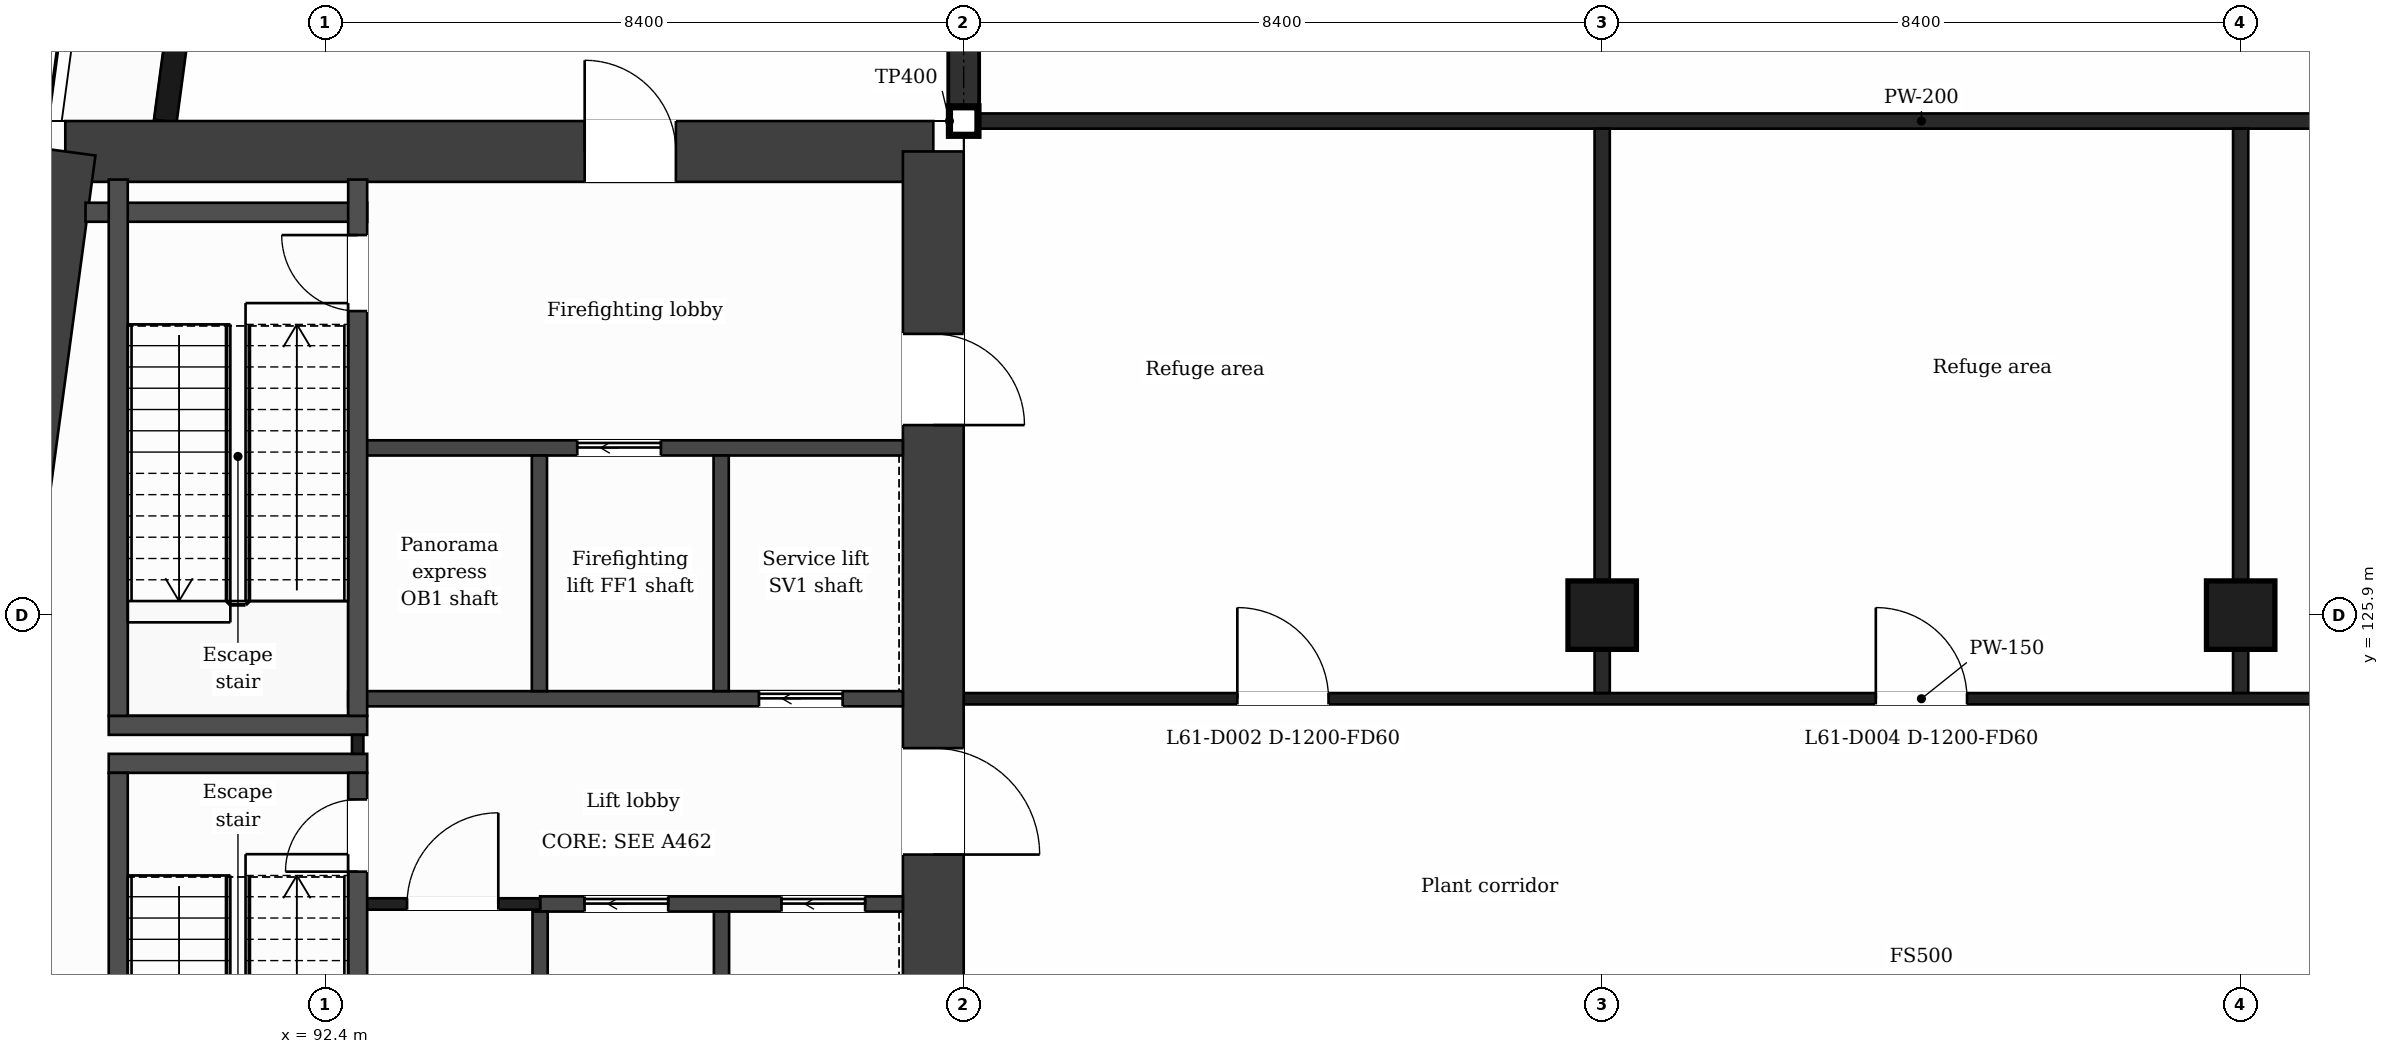
"""IFC4 building model, lengths in metres.
Left out: names, types, materials, properties, quantities, classifications, styles, units other than length and angle.
Written with IfcOpenShell. Run it as: python <this file> out.ifc"""

import sys

from ifc_helpers import new_model, si_unit, direction, frame, frame_2d, origin, origin_2d, place, context, subcontext, project, spatial, rectangle, extrude, element, fill, save


model = new_model("IFC4")
c1 = context("Model", 3, precision=1e-05, world=origin(), true_north=direction((0.0, 1.0)))
c2 = subcontext(c1, "Body", "Model", "MODEL_VIEW")
j1 = project(units=[si_unit("LENGTHUNIT", "METRE"), si_unit("PLANEANGLEUNIT", "RADIAN")], contexts=[c1])
p1 = place(None, origin())
s1 = spatial("IfcSite", under=j1, at=p1, CompositionType="ELEMENT")
p2 = place(p1, origin())
s2 = spatial("IfcBuilding", under=s1, at=p2, CompositionType="ELEMENT")
p3 = place(p2, frame((0.0, 0.0, 254.0)))
s3 = spatial("IfcBuildingStorey", under=s2, at=p3, CompositionType="ELEMENT", Elevation=254.0)
p4 = place(p3, frame((88.98, 132.0, 0.0), z_axis=(0.0, 0.0, 1.0), x_axis=(1.0, 0.0, 0.0)))
e1 = element("IfcWall", 1, at=p4, inside=s3, PredefinedType="SHEAR", context=c2, shape_type="SweptSolid", body=[
    extrude(rectangle(XDim=11.419, YDim=0.8, at=frame_2d((5.71, 0.0))), origin(), (0.0, 0.0, 1.0), 5.0),
])
p5 = place(p4, frame((6.833, 0.0, 0.0)))
e2 = element("IfcOpeningElement", 2, at=p5, cuts=e1, PredefinedType="OPENING", context=c2, shape_type="SweptSolid", body=[
    extrude(rectangle(XDim=1.2, YDim=2.1, at=frame_2d((0.6, 1.05))), frame((0.0, 0.41, 0.0), z_axis=(0.0, -1.0, 0.0), x_axis=(1.0, 0.0, 0.0)), (0.0, 0.0, 1.0), 0.82),
])
p6 = place(p3, frame((100.4, 132.0, 0.0), z_axis=(0.0, 0.0, 1.0), x_axis=(0.0, -1.0, 0.0)))
e3 = element("IfcWall", 3, at=p6, inside=s3, PredefinedType="SHEAR", context=c2, shape_type="SweptSolid", body=[
    extrude(rectangle(XDim=21.2, YDim=0.8, at=frame_2d((10.6, 0.0))), origin(), (0.0, 0.0, 1.0), 5.0),
])
p7 = place(p6, frame((2.4, 0.0, 0.0)))
e4 = element("IfcOpeningElement", 4, at=p7, cuts=e3, PredefinedType="OPENING", context=c2, shape_type="SweptSolid", body=[
    extrude(rectangle(XDim=1.2, YDim=2.1, at=frame_2d((0.6, 1.05))), frame((0.0, 0.41, 0.0), z_axis=(0.0, -1.0, 0.0), x_axis=(1.0, 0.0, 0.0)), (0.0, 0.0, 1.0), 0.82),
])
p8 = place(p6, frame((7.85, 0.0, 0.0)))
e5 = element("IfcOpeningElement", 5, at=p8, cuts=e3, PredefinedType="OPENING", context=c2, shape_type="SweptSolid", body=[
    extrude(rectangle(XDim=1.4, YDim=2.1, at=frame_2d((0.7, 1.05))), frame((0.0, 0.41, 0.0), z_axis=(0.0, -1.0, 0.0), x_axis=(1.0, 0.0, 0.0)), (0.0, 0.0, 1.0), 0.82),
])
p9 = place(p3, frame((86.127, 110.8, 0.0), z_axis=(0.0, 0.0, 1.0), x_axis=(0.133408347329, 0.991061154956, 0.0)))
e6 = element("IfcWall", 6, at=p9, inside=s3, PredefinedType="SHEAR", context=c2, shape_type="SweptSolid", body=[
    extrude(rectangle(XDim=21.391, YDim=0.8, at=frame_2d((10.696, 0.0))), origin(), (0.0, 0.0, 1.0), 5.0),
])
for number, where, z_axis, x_axis in (
    (7, (109.2, 125.9, 0.0), (0.0, 0.0, 1.0), (1.0, 0.0, 0.0)),
    (8, (117.6, 125.9, 0.0), (0.0, 0.0, 1.0), (1.0, 0.0, 0.0)),
):
    element("IfcColumn", number, at=place(p3, frame(where, z_axis=z_axis, x_axis=x_axis)), inside=s3, PredefinedType="COLUMN", context=c2, shape_type="SweptSolid", body=[
        extrude(rectangle(XDim=0.9, YDim=0.9, at=origin_2d()), origin(), (0.0, 0.0, 1.0), 5.0),
    ])
p10 = place(p3, frame((91.177, 138.95, 0.0), z_axis=(0.0, 0.0, 1.0), x_axis=(-0.133426664613, -0.991058689065, 0.0)))
e9 = element("IfcWall", 9, at=p10, inside=s3, PredefinedType="SOLIDWALL", context=c2, shape_type="SweptSolid", body=[
    extrude(rectangle(XDim=6.609, YDim=0.3, at=frame_2d((3.305, 0.0))), origin(), (0.0, 0.0, 1.0), 4.68),
])
p11 = place(p10, frame((4.294, 0.0, 0.0)))
e10 = element("IfcOpeningElement", 10, at=p11, cuts=e9, PredefinedType="OPENING", context=c2, shape_type="SweptSolid", body=[
    extrude(rectangle(XDim=1.2, YDim=2.4, at=frame_2d((0.6, 1.2))), frame((0.0, 0.16, 0.0), z_axis=(0.0, -1.0, 0.0), x_axis=(1.0, 0.0, 0.0)), (0.0, 0.0, 1.0), 0.32),
])
p12 = place(p3, frame((95.227, 122.1, 0.0), z_axis=(0.0, 0.0, 1.0), x_axis=(1.0, 0.0, 0.0)))
e11 = element("IfcWall", 11, at=p12, inside=s3, PredefinedType="PARTITIONING", context=c2, shape_type="SweptSolid", body=[
    extrude(rectangle(XDim=4.773, YDim=0.2, at=frame_2d((2.386, 0.0))), origin(), (0.0, 0.0, 1.0), 4.68),
])
p13 = place(p12, frame((0.585, 0.0, 0.0)))
e12 = element("IfcOpeningElement", 12, at=p13, cuts=e11, PredefinedType="OPENING", context=c2, shape_type="SweptSolid", body=[
    extrude(rectangle(XDim=1.1, YDim=2.1, at=frame_2d((0.55, 1.05))), frame((0.0, 0.11, 0.0), z_axis=(0.0, -1.0, 0.0), x_axis=(1.0, 0.0, 0.0)), (0.0, 0.0, 1.0), 0.22),
])
p14 = place(p12, frame((3.176, 0.0, 0.0)))
e13 = element("IfcOpeningElement", 13, at=p14, cuts=e11, PredefinedType="OPENING", context=c2, shape_type="SweptSolid", body=[
    extrude(rectangle(XDim=1.1, YDim=2.1, at=frame_2d((0.55, 1.05))), frame((0.0, 0.11, 0.0), z_axis=(0.0, -1.0, 0.0), x_axis=(1.0, 0.0, 0.0)), (0.0, 0.0, 1.0), 0.22),
])
p15 = place(p3, frame((92.827, 122.1, 0.0), z_axis=(0.0, 0.0, 1.0), x_axis=(1.0, 0.0, 0.0)))
e14 = element("IfcWall", 14, at=p15, inside=s3, PredefinedType="PARTITIONING", context=c2, shape_type="SweptSolid", body=[
    extrude(rectangle(XDim=2.4, YDim=0.15, at=frame_2d((1.2, 0.0))), origin(), (0.0, 0.0, 1.0), 4.68),
])
p16 = place(p15, frame((0.65, 0.0, 0.0)))
e15 = element("IfcOpeningElement", 15, at=p16, cuts=e14, PredefinedType="OPENING", context=c2, shape_type="SweptSolid", body=[
    extrude(rectangle(XDim=1.2, YDim=2.1, at=frame_2d((0.6, 1.05))), frame((0.0, 0.085, 0.0), z_axis=(0.0, -1.0, 0.0), x_axis=(1.0, 0.0, 0.0)), (0.0, 0.0, 1.0), 0.17),
])
for number, where, z_axis, x_axis in (
    (16, (89.552, 123.95, 0.0), (0.0, 0.0, 1.0), (1.0, 0.0, 0.0)),
    (17, (89.552, 124.45, 0.0), (0.0, 0.0, 1.0), (1.0, 0.0, 0.0)),
):
    element("IfcWall", number, at=place(p3, frame(where, z_axis=z_axis, x_axis=x_axis)), inside=s3, PredefinedType="PARTITIONING", context=c2, shape_type="SweptSolid", body=[
        extrude(rectangle(XDim=3.4, YDim=0.25, at=frame_2d((1.7, 0.0))), origin(), (0.0, 0.0, 1.0), 4.68),
    ])
p17 = place(p3, frame((92.702, 124.8, 0.0), z_axis=(0.0, 0.0, 1.0), x_axis=(1.0, 0.0, 0.0)))
e18 = element("IfcWall", 18, at=p17, inside=s3, PredefinedType="PARTITIONING", context=c2, shape_type="SweptSolid", body=[
    extrude(rectangle(XDim=7.298, YDim=0.2, at=frame_2d((3.649, 0.0))), origin(), (0.0, 0.0, 1.0), 4.68),
])
p18 = place(p17, frame((5.405, 0.0, 0.0)))
e19 = element("IfcOpeningElement", 19, at=p18, cuts=e18, PredefinedType="OPENING", context=c2, shape_type="SweptSolid", body=[
    extrude(rectangle(XDim=1.1, YDim=2.1, at=frame_2d((0.55, 1.05))), frame((0.0, 0.11, 0.0), z_axis=(0.0, -1.0, 0.0), x_axis=(1.0, 0.0, 0.0)), (0.0, 0.0, 1.0), 0.22),
])
p19 = place(p3, frame((100.8, 124.8, 0.0), z_axis=(0.0, 0.0, 1.0), x_axis=(1.0, 0.0, 0.0)))
e20 = element("IfcWall", 20, at=p19, inside=s3, PredefinedType="PARTITIONING", context=c2, shape_type="SweptSolid", body=[
    extrude(rectangle(XDim=25.2, YDim=0.15, at=frame_2d((12.6, 0.0))), origin(), (0.0, 0.0, 1.0), 4.68),
])
p20 = place(p19, frame((3.6, 0.0, 0.0)))
e21 = element("IfcOpeningElement", 21, at=p20, cuts=e20, PredefinedType="OPENING", context=c2, shape_type="SweptSolid", body=[
    extrude(rectangle(XDim=1.2, YDim=2.1, at=frame_2d((0.6, 1.05))), frame((0.0, 0.085, 0.0), z_axis=(0.0, -1.0, 0.0), x_axis=(1.0, 0.0, 0.0)), (0.0, 0.0, 1.0), 0.17),
])
p21 = place(p19, frame((12.0, 0.0, 0.0)))
e22 = element("IfcOpeningElement", 22, at=p21, cuts=e20, PredefinedType="OPENING", context=c2, shape_type="SweptSolid", body=[
    extrude(rectangle(XDim=1.2, YDim=2.1, at=frame_2d((0.6, 1.05))), frame((0.0, 0.085, 0.0), z_axis=(0.0, -1.0, 0.0), x_axis=(1.0, 0.0, 0.0)), (0.0, 0.0, 1.0), 0.17),
])
p22 = place(p19, frame((20.4, 0.0, 0.0)))
e23 = element("IfcOpeningElement", 23, at=p22, cuts=e20, PredefinedType="OPENING", context=c2, shape_type="SweptSolid", body=[
    extrude(rectangle(XDim=1.2, YDim=2.1, at=frame_2d((0.6, 1.05))), frame((0.0, 0.085, 0.0), z_axis=(0.0, -1.0, 0.0), x_axis=(1.0, 0.0, 0.0)), (0.0, 0.0, 1.0), 0.17),
])
p23 = place(p3, frame((92.827, 128.1, 0.0), z_axis=(0.0, 0.0, 1.0), x_axis=(1.0, 0.0, 0.0)))
e24 = element("IfcWall", 24, at=p23, inside=s3, PredefinedType="PARTITIONING", context=c2, shape_type="SweptSolid", body=[
    extrude(rectangle(XDim=7.173, YDim=0.2, at=frame_2d((3.586, 0.0))), origin(), (0.0, 0.0, 1.0), 4.68),
])
p24 = place(p23, frame((2.889, 0.0, 0.0)))
e25 = element("IfcOpeningElement", 25, at=p24, cuts=e24, PredefinedType="OPENING", context=c2, shape_type="SweptSolid", body=[
    extrude(rectangle(XDim=1.1, YDim=2.1, at=frame_2d((0.55, 1.05))), frame((0.0, 0.11, 0.0), z_axis=(0.0, -1.0, 0.0), x_axis=(1.0, 0.0, 0.0)), (0.0, 0.0, 1.0), 0.22),
])
p25 = place(p3, frame((89.246, 131.2, 0.0), z_axis=(0.0, 0.0, 1.0), x_axis=(1.0, 0.0, 0.0)))
e26 = element("IfcWall", 26, at=p25, inside=s3, PredefinedType="PARTITIONING", context=c2, shape_type="SweptSolid", body=[
    extrude(rectangle(XDim=3.706, YDim=0.25, at=frame_2d((1.853, 0.0))), origin(), (0.0, 0.0, 1.0), 4.68),
])
p26 = place(p3, frame((100.7, 132.4, 0.0), z_axis=(0.0, 0.0, 1.0), x_axis=(1.0, 0.0, 0.0)))
e27 = element("IfcWall", 27, at=p26, inside=s3, PredefinedType="PARTITIONING", context=c2, shape_type="SweptSolid", body=[
    extrude(rectangle(XDim=25.4, YDim=0.2, at=frame_2d((12.7, 0.0))), origin(), (0.0, 0.0, 1.0), 4.68),
])
p27 = place(p26, frame((20.5, 0.0, 0.0)))
e28 = element("IfcOpeningElement", 28, at=p27, cuts=e27, PredefinedType="OPENING", context=c2, shape_type="SweptSolid", body=[
    extrude(rectangle(XDim=1.2, YDim=2.1, at=frame_2d((0.6, 1.05))), frame((0.0, 0.11, 0.0), z_axis=(0.0, -1.0, 0.0), x_axis=(1.0, 0.0, 0.0)), (0.0, 0.0, 1.0), 0.22),
])
for number, where, z_axis, x_axis in (
    (29, (89.677, 116.77, 0.0), (0.0, 0.0, 1.0), (0.0, 1.0, 0.0)),
    (30, (89.677, 124.575, 0.0), (0.0, 0.0, 1.0), (0.0, 1.0, 0.0)),
):
    element("IfcWall", number, at=place(p3, frame(where, z_axis=z_axis, x_axis=x_axis)), inside=s3, PredefinedType="PARTITIONING", context=c2, shape_type="SweptSolid", body=[
        extrude(rectangle(XDim=7.055, YDim=0.25, at=frame_2d((3.527, 0.0))), origin(), (0.0, 0.0, 1.0), 4.68),
    ])
p28 = place(p3, frame((92.827, 124.075, 0.0), z_axis=(0.0, 0.0, 1.0), x_axis=(0.0, 1.0, 0.0)))
e31 = element("IfcWall", 31, at=p28, inside=s3, PredefinedType="PARTITIONING", context=c2, shape_type="SweptSolid", body=[
    extrude(rectangle(XDim=0.25, YDim=0.15, at=frame_2d((0.125, 0.0))), origin(), (0.0, 0.0, 1.0), 4.68),
])
p29 = place(p3, frame((92.827, 116.77, 0.0), z_axis=(0.0, 0.0, 1.0), x_axis=(0.0, 1.0, 0.0)))
e32 = element("IfcWall", 32, at=p29, inside=s3, PredefinedType="PARTITIONING", context=c2, shape_type="SweptSolid", body=[
    extrude(rectangle(XDim=7.055, YDim=0.25, at=frame_2d((3.527, 0.0))), origin(), (0.0, 0.0, 1.0), 4.68),
])
p30 = place(p29, frame((5.755, 0.0, 0.0)))
e33 = element("IfcOpeningElement", 33, at=p30, cuts=e32, PredefinedType="OPENING", context=c2, shape_type="SweptSolid", body=[
    extrude(rectangle(XDim=0.95, YDim=2.1, at=frame_2d((0.475, 1.05))), frame((0.0, 0.135, 0.0), z_axis=(0.0, -1.0, 0.0), x_axis=(1.0, 0.0, 0.0)), (0.0, 0.0, 1.0), 0.27),
])
p31 = place(p3, frame((92.827, 124.575, 0.0), z_axis=(0.0, 0.0, 1.0), x_axis=(0.0, 1.0, 0.0)))
e34 = element("IfcWall", 34, at=p31, inside=s3, PredefinedType="PARTITIONING", context=c2, shape_type="SweptSolid", body=[
    extrude(rectangle(XDim=7.055, YDim=0.25, at=frame_2d((3.527, 0.0))), origin(), (0.0, 0.0, 1.0), 4.68),
])
p32 = place(p31, frame((5.325, 0.0, 0.0)))
e35 = element("IfcOpeningElement", 35, at=p32, cuts=e34, PredefinedType="OPENING", context=c2, shape_type="SweptSolid", body=[
    extrude(rectangle(XDim=1.0, YDim=2.1, at=frame_2d((0.5, 1.05))), frame((0.0, 0.135, 0.0), z_axis=(0.0, -1.0, 0.0), x_axis=(1.0, 0.0, 0.0)), (0.0, 0.0, 1.0), 0.27),
])
p33 = place(p3, frame((95.218, 124.9, 0.0), z_axis=(0.0, 0.0, 1.0), x_axis=(0.0, 1.0, 0.0)))
e36 = element("IfcWall", 36, at=p33, inside=s3, PredefinedType="PARTITIONING", context=c2, shape_type="SweptSolid", body=[
    extrude(rectangle(XDim=3.1, YDim=0.2, at=frame_2d((1.55, 0.0))), origin(), (0.0, 0.0, 1.0), 4.68),
])
p34 = place(p3, frame((95.227, 116.77, 0.0), z_axis=(0.0, 0.0, 1.0), x_axis=(0.0, 1.0, 0.0)))
e37 = element("IfcWall", 37, at=p34, inside=s3, PredefinedType="PARTITIONING", context=c2, shape_type="SweptSolid", body=[
    extrude(rectangle(XDim=5.23, YDim=0.2, at=frame_2d((2.615, 0.0))), origin(), (0.0, 0.0, 1.0), 4.68),
])
p35 = place(p34, frame((0.78, 0.0, 0.0)))
e38 = element("IfcOpeningElement", 38, at=p35, cuts=e37, PredefinedType="OPENING", context=c2, shape_type="SweptSolid", body=[
    extrude(rectangle(XDim=0.9, YDim=2.1, at=frame_2d((0.45, 1.05))), frame((0.0, 0.11, 0.0), z_axis=(0.0, -1.0, 0.0), x_axis=(1.0, 0.0, 0.0)), (0.0, 0.0, 1.0), 0.22),
])
for number, where, z_axis, x_axis in (
    (39, (97.609, 124.9, 0.0), (0.0, 0.0, 1.0), (0.0, 1.0, 0.0)),
    (40, (97.614, 118.9, 0.0), (0.0, 0.0, 1.0), (0.0, 1.0, 0.0)),
):
    element("IfcWall", number, at=place(p3, frame(where, z_axis=z_axis, x_axis=x_axis)), inside=s3, PredefinedType="PARTITIONING", context=c2, shape_type="SweptSolid", body=[
        extrude(rectangle(XDim=3.1, YDim=0.2, at=frame_2d((1.55, 0.0))), origin(), (0.0, 0.0, 1.0), 4.68),
    ])
p36 = place(p3, frame((100.8, 132.5, 0.0), z_axis=(0.0, 0.0, 1.0), x_axis=(0.0, 1.0, 0.0)))
e41 = element("IfcWall", 41, at=p36, inside=s3, PredefinedType="PARTITIONING", context=c2, shape_type="SweptSolid", body=[
    extrude(rectangle(XDim=10.51, YDim=0.2, at=frame_2d((5.255, 0.0))), origin(), (0.0, 0.0, 1.0), 4.68),
])
for number, where, z_axis, x_axis in (
    (42, (109.2, 124.875, 0.0), (0.0, 0.0, 1.0), (0.0, 1.0, 0.0)),
    (43, (117.6, 124.875, 0.0), (0.0, 0.0, 1.0), (0.0, 1.0, 0.0)),
):
    element("IfcWall", number, at=place(p3, frame(where, z_axis=z_axis, x_axis=x_axis)), inside=s3, PredefinedType="PARTITIONING", context=c2, shape_type="SweptSolid", body=[
        extrude(rectangle(XDim=7.425, YDim=0.2, at=frame_2d((3.712, 0.0))), origin(), (0.0, 0.0, 1.0), 4.68),
    ])
p37 = place(p20, origin())
e44 = element("IfcDoor", 44, at=p37, inside=s3, OperationType="SINGLE_SWING_LEFT", PredefinedType="DOOR", context=c2, shape_type="SweptSolid", body=[
    extrude(rectangle(XDim=1.2, YDim=2.1, at=frame_2d((0.6, 1.05))), frame((0.0, 0.025, 0.0), z_axis=(0.0, -1.0, 0.0), x_axis=(1.0, 0.0, 0.0)), (0.0, 0.0, 1.0), 0.05),
])
fill(e21, e44)
p38 = place(p21, origin())
e45 = element("IfcDoor", 45, at=p38, inside=s3, OperationType="SINGLE_SWING_LEFT", PredefinedType="DOOR", context=c2, shape_type="SweptSolid", body=[
    extrude(rectangle(XDim=1.2, YDim=2.1, at=frame_2d((0.6, 1.05))), frame((0.0, 0.025, 0.0), z_axis=(0.0, -1.0, 0.0), x_axis=(1.0, 0.0, 0.0)), (0.0, 0.0, 1.0), 0.05),
])
fill(e22, e45)
p39 = place(p16, origin())
e46 = element("IfcDoor", 46, at=p39, inside=s3, OperationType="SINGLE_SWING_RIGHT", PredefinedType="DOOR", context=c2, shape_type="SweptSolid", body=[
    extrude(rectangle(XDim=1.2, YDim=2.1, at=frame_2d((0.6, 1.05))), frame((0.0, 0.025, 0.0), z_axis=(0.0, -1.0, 0.0), x_axis=(1.0, 0.0, 0.0)), (0.0, 0.0, 1.0), 0.05),
])
fill(e15, e46)
p40 = place(p13, origin())
e47 = element("IfcDoor", 47, at=p40, inside=s3, OperationType="SLIDING_TO_LEFT", PredefinedType="DOOR", context=c2, shape_type="SweptSolid", body=[
    extrude(rectangle(XDim=1.1, YDim=2.1, at=frame_2d((0.55, 1.05))), frame((0.0, 0.025, 0.0), z_axis=(0.0, -1.0, 0.0), x_axis=(1.0, 0.0, 0.0)), (0.0, 0.0, 1.0), 0.05),
])
fill(e12, e47)
p41 = place(p14, origin())
e48 = element("IfcDoor", 48, at=p41, inside=s3, OperationType="SLIDING_TO_LEFT", PredefinedType="DOOR", context=c2, shape_type="SweptSolid", body=[
    extrude(rectangle(XDim=1.1, YDim=2.1, at=frame_2d((0.55, 1.05))), frame((0.0, 0.025, 0.0), z_axis=(0.0, -1.0, 0.0), x_axis=(1.0, 0.0, 0.0)), (0.0, 0.0, 1.0), 0.05),
])
fill(e13, e48)
p42 = place(p24, origin())
e49 = element("IfcDoor", 49, at=p42, inside=s3, OperationType="SLIDING_TO_LEFT", PredefinedType="DOOR", context=c2, shape_type="SweptSolid", body=[
    extrude(rectangle(XDim=1.1, YDim=2.1, at=frame_2d((0.55, 1.05))), frame((0.0, 0.025, 0.0), z_axis=(0.0, -1.0, 0.0), x_axis=(1.0, 0.0, 0.0)), (0.0, 0.0, 1.0), 0.05),
])
fill(e25, e49)
p43 = place(p18, origin())
e50 = element("IfcDoor", 50, at=p43, inside=s3, OperationType="SLIDING_TO_LEFT", PredefinedType="DOOR", context=c2, shape_type="SweptSolid", body=[
    extrude(rectangle(XDim=1.1, YDim=2.1, at=frame_2d((0.55, 1.05))), frame((0.0, 0.025, 0.0), z_axis=(0.0, -1.0, 0.0), x_axis=(1.0, 0.0, 0.0)), (0.0, 0.0, 1.0), 0.05),
])
fill(e19, e50)
p44 = place(p30, origin())
e51 = element("IfcDoor", 51, at=p44, inside=s3, OperationType="SINGLE_SWING_LEFT", PredefinedType="DOOR", context=c2, shape_type="SweptSolid", body=[
    extrude(rectangle(XDim=0.95, YDim=2.1, at=frame_2d((0.475, 1.05))), frame((0.0, 0.025, 0.0), z_axis=(0.0, -1.0, 0.0), x_axis=(1.0, 0.0, 0.0)), (0.0, 0.0, 1.0), 0.05),
])
fill(e33, e51)
p45 = place(p32, origin())
e52 = element("IfcDoor", 52, at=p45, inside=s3, OperationType="SINGLE_SWING_RIGHT", PredefinedType="DOOR", context=c2, shape_type="SweptSolid", body=[
    extrude(rectangle(XDim=1.0, YDim=2.1, at=frame_2d((0.5, 1.05))), frame((0.0, 0.025, 0.0), z_axis=(0.0, -1.0, 0.0), x_axis=(1.0, 0.0, 0.0)), (0.0, 0.0, 1.0), 0.05),
])
fill(e35, e52)
p46 = place(p5, origin())
e53 = element("IfcDoor", 53, at=p46, inside=s3, OperationType="SINGLE_SWING_LEFT", PredefinedType="DOOR", context=c2, shape_type="SweptSolid", body=[
    extrude(rectangle(XDim=1.2, YDim=2.1, at=frame_2d((0.6, 1.05))), frame((0.0, 0.025, 0.0), z_axis=(0.0, -1.0, 0.0), x_axis=(1.0, 0.0, 0.0)), (0.0, 0.0, 1.0), 0.05),
])
fill(e2, e53)
p47 = place(p7, origin())
e54 = element("IfcDoor", 54, at=p47, inside=s3, OperationType="SINGLE_SWING_RIGHT", PredefinedType="DOOR", context=c2, shape_type="SweptSolid", body=[
    extrude(rectangle(XDim=1.2, YDim=2.1, at=frame_2d((0.6, 1.05))), frame((0.0, 0.025, 0.0), z_axis=(0.0, -1.0, 0.0), x_axis=(1.0, 0.0, 0.0)), (0.0, 0.0, 1.0), 0.05),
])
fill(e4, e54)
p48 = place(p8, origin())
e55 = element("IfcDoor", 55, at=p48, inside=s3, OperationType="SINGLE_SWING_RIGHT", PredefinedType="DOOR", context=c2, shape_type="SweptSolid", body=[
    extrude(rectangle(XDim=1.4, YDim=2.1, at=frame_2d((0.7, 1.05))), frame((0.0, 0.025, 0.0), z_axis=(0.0, -1.0, 0.0), x_axis=(1.0, 0.0, 0.0)), (0.0, 0.0, 1.0), 0.05),
])
fill(e5, e55)
save(model, sys.argv[1])
